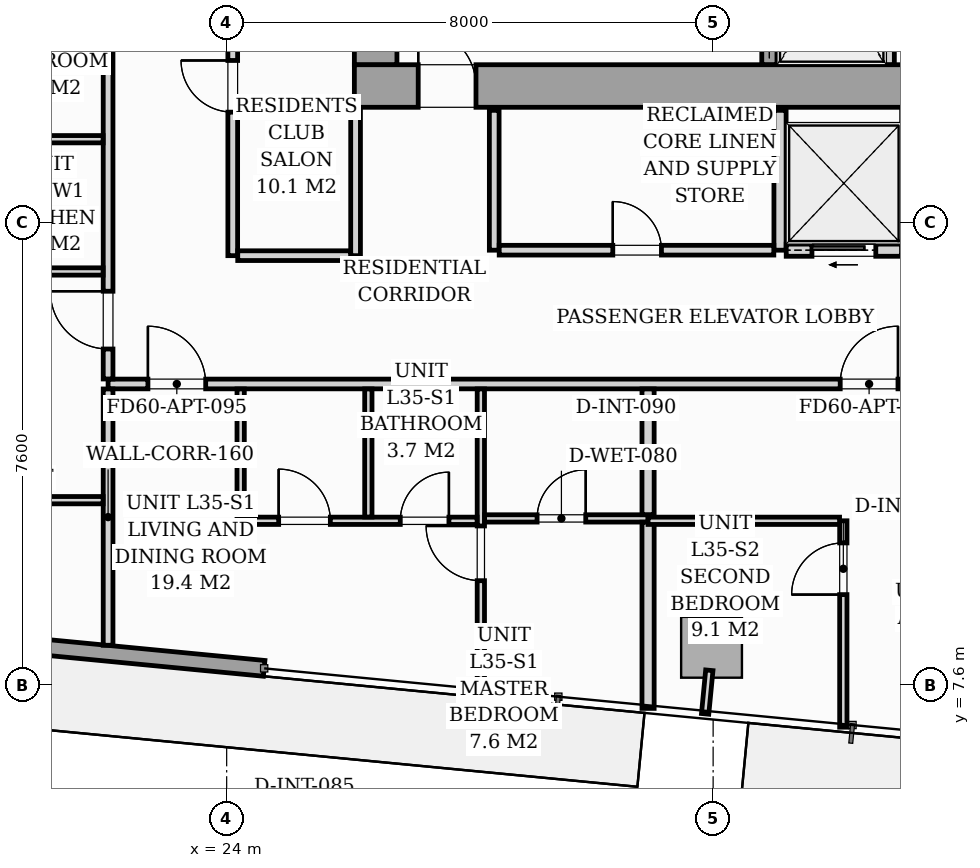
"""IFC4 building model, lengths in metres.
Left out: names, types, materials, properties, quantities, classifications, styles, units other than length and angle.
Written with IfcOpenShell. Run it as: python <this file> out.ifc"""

import sys

from ifc_helpers import new_model, si_unit, direction, frame, frame_2d, origin, origin_2d, place, context, subcontext, project, spatial, rectangle, i_section, extrude, source, transform, mapped, element, fill, save


model = new_model("IFC4")
c1 = context("Model", 3, precision=1e-05, world=origin(), true_north=direction((0.0, 1.0)))
c2 = subcontext(c1, "Body", "Model", "MODEL_VIEW")
j1 = project(units=[si_unit("LENGTHUNIT", "METRE"), si_unit("PLANEANGLEUNIT", "RADIAN")], contexts=[c1])
p1 = place(None, origin())
s1 = spatial("IfcSite", under=j1, at=p1, CompositionType="ELEMENT")
p2 = place(p1, origin())
s2 = spatial("IfcBuilding", under=s1, at=p2, CompositionType="ELEMENT")
p3 = place(p2, frame((0.0, 0.0, 124.6)))
s3 = spatial("IfcBuildingStorey", under=s2, at=p3, CompositionType="ELEMENT", Elevation=124.6)
m1 = source(origin(), c2, "Body", "SweptSolid", [
    extrude(i_section(OverallWidth=0.421, OverallDepth=0.465, WebThickness=0.045, FlangeThickness=0.073, FilletRadius=0.018, at=origin_2d()), origin(), (0.0, 0.0, 1.0), 3.196),
])
for number, where, z_axis, x_axis in (
    (1, (26.4, 17.4, 0.002), (0.0, 0.0, 1.0), (1.0, 0.0, 0.0)),
    (2, (33.12, 17.4, 0.002), (0.0, 0.0, 1.0), (1.0, 0.0, 0.0)),
):
    element("IfcColumn", number, at=place(p3, frame(where, z_axis=z_axis, x_axis=x_axis)), inside=s3, PredefinedType="PILASTER", context=c2, shape_type="MappedRepresentation", body=[
        mapped(m1, transform((0.0, 0.0, 0.0), scale=1.0)),
    ])
m2 = source(origin(), c2, "Body", "SweptSolid", [
    extrude(rectangle(XDim=1.0, YDim=1.0, at=origin_2d()), origin(), (0.0, 0.0, 1.0), 3.194),
])
p4 = place(p3, frame((31.974, 8.22, 0.004), z_axis=(0.0, 0.0, 1.0), x_axis=(0.995396198367, -0.09584575252, 0.0)))
e3 = element("IfcColumn", 3, at=p4, inside=s3, PredefinedType="COLUMN", context=c2, shape_type="MappedRepresentation", body=[
    mapped(m2, transform((0.0, 0.0, 0.0), scale=1.0)),
])
p5 = place(p3, frame((24.617, 7.873, 0.0), z_axis=(0.0, 0.0, 1.0), x_axis=(-0.995395976631, 0.095848055311, 0.0)))
e4 = element("IfcWall", 4, at=p5, inside=s3, PredefinedType="STANDARD", context=c2, shape_type="SweptSolid", body=[
    extrude(rectangle(XDim=17.01, YDim=0.26, at=frame_2d((8.505, 0.0))), origin(), (0.0, 0.0, 1.0), 2.94),
])
p6 = place(p5, frame((6.65, 0.0, 0.0)))
e5 = element("IfcOpeningElement", 5, at=p6, cuts=e4, PredefinedType="OPENING", context=c2, shape_type="SweptSolid", body=[
    extrude(rectangle(XDim=1.8, YDim=2.06, at=frame_2d((0.9, 1.03))), frame((0.0, 0.14, 0.0), z_axis=(0.0, -1.0, 0.0), x_axis=(1.0, 0.0, 0.0)), (0.0, 0.0, 1.0), 0.28),
])
p7 = place(p5, frame((9.25, 0.0, 0.65)))
e6 = element("IfcOpeningElement", 6, at=p7, cuts=e4, PredefinedType="OPENING", context=c2, shape_type="SweptSolid", body=[
    extrude(rectangle(XDim=1.6, YDim=1.5, at=frame_2d((0.8, 0.75))), frame((0.0, 0.14, 0.0), z_axis=(0.0, -1.0, 0.0), x_axis=(1.0, 0.0, 0.0)), (0.0, 0.0, 1.0), 0.28),
])
p8 = place(p3, frame((26.1, 17.45, 0.0), z_axis=(0.0, 0.0, 1.0), x_axis=(1.0, 0.0, 0.0)))
e7 = element("IfcWall", 7, at=p8, inside=s3, PredefinedType="SHEAR", context=c2, shape_type="SweptSolid", body=[
    extrude(rectangle(XDim=19.8, YDim=0.7, at=frame_2d((9.9, 0.0))), origin(), (0.0, 0.0, 1.0), 3.2),
])
p9 = place(p8, frame((1.05, 0.0, 0.0)))
e8 = element("IfcOpeningElement", 8, at=p9, cuts=e7, PredefinedType="OPENING", context=c2, shape_type="SweptSolid", body=[
    extrude(rectangle(XDim=0.95, YDim=2.06, at=frame_2d((0.475, 1.03))), frame((0.0, 0.36, 0.0), z_axis=(0.0, -1.0, 0.0), x_axis=(1.0, 0.0, 0.0)), (0.0, 0.0, 1.0), 0.72),
])
p10 = place(p8, frame((9.48, 0.0, 0.0)))
e9 = element("IfcOpeningElement", 9, at=p10, cuts=e7, PredefinedType="OPENING", context=c2, shape_type="SweptSolid", body=[
    extrude(rectangle(XDim=0.85, YDim=2.0, at=frame_2d((0.425, 1.0))), frame((0.0, 0.36, 0.0), z_axis=(0.0, -1.0, 0.0), x_axis=(1.0, 0.0, 0.0)), (0.0, 0.0, 1.0), 0.72),
])
p11 = place(p8, frame((17.65, 0.0, 0.0)))
e10 = element("IfcOpeningElement", 10, at=p11, cuts=e7, PredefinedType="OPENING", context=c2, shape_type="SweptSolid", body=[
    extrude(rectangle(XDim=0.95, YDim=2.06, at=frame_2d((0.475, 1.03))), frame((0.0, 0.36, 0.0), z_axis=(0.0, -1.0, 0.0), x_axis=(1.0, 0.0, 0.0)), (0.0, 0.0, 1.0), 0.72),
])
p12 = place(p3, frame((26.45, 17.802, 0.0), z_axis=(0.0, 0.0, 1.0), x_axis=(0.0, 1.0, 0.0)))
e11 = element("IfcWall", 11, at=p12, inside=s3, PredefinedType="SHEAR", context=c2, shape_type="SweptSolid", body=[
    extrude(rectangle(XDim=5.796, YDim=0.7, at=frame_2d((2.898, 0.0))), origin(), (0.0, 0.0, 1.0), 3.2),
])
p13 = place(p3, frame((32.925, 17.802, 0.0), z_axis=(0.0, 0.0, 1.0), x_axis=(0.0, 1.0, 0.0)))
e12 = element("IfcWall", 12, at=p13, inside=s3, PredefinedType="SOLIDWALL", context=c2, shape_type="SweptSolid", body=[
    extrude(rectangle(XDim=2.646, YDim=0.25, at=frame_2d((1.323, 0.0))), origin(), (0.0, 0.0, 1.0), 3.2),
])
p14 = place(p13, frame((0.598, 0.0, 0.0)))
e13 = element("IfcOpeningElement", 13, at=p14, cuts=e12, PredefinedType="OPENING", context=c2, shape_type="SweptSolid", body=[
    extrude(rectangle(XDim=1.1, YDim=2.08, at=frame_2d((0.55, 1.04))), frame((0.0, 0.135, 0.0), z_axis=(0.0, -1.0, 0.0), x_axis=(1.0, 0.0, 0.0)), (0.0, 0.0, 1.0), 0.27),
])
p15 = place(p3, frame((34.9, 17.802, 0.0), z_axis=(0.0, 0.0, 1.0), x_axis=(0.0, 1.0, 0.0)))
e14 = element("IfcWall", 14, at=p15, inside=s3, PredefinedType="PARTITIONING", context=c2, shape_type="SweptSolid", body=[
    extrude(rectangle(XDim=2.646, YDim=0.16, at=frame_2d((1.323, 0.0))), origin(), (0.0, 0.0, 1.0), 2.94),
])
p16 = place(p3, frame((28.4, 14.75, 0.0), z_axis=(0.0, 0.0, 1.0), x_axis=(0.0, 1.0, 0.0)))
e15 = element("IfcWall", 15, at=p16, inside=s3, PredefinedType="PARTITIONING", context=c2, shape_type="SweptSolid", body=[
    extrude(rectangle(XDim=2.3, YDim=0.16, at=frame_2d((1.15, 0.0))), origin(), (0.0, 0.0, 1.0), 2.94),
])
p17 = place(p3, frame((33.1, 14.75, 0.0), z_axis=(0.0, 0.0, 1.0), x_axis=(0.0, 1.0, 0.0)))
e16 = element("IfcWall", 16, at=p17, inside=s3, PredefinedType="PARTITIONING", context=c2, shape_type="SweptSolid", body=[
    extrude(rectangle(XDim=2.3, YDim=0.2, at=frame_2d((1.15, 0.0))), origin(), (0.0, 0.0, 1.0), 2.94),
])
p18 = place(p3, frame((28.482, 14.75, 0.0), z_axis=(0.0, 0.0, 1.0), x_axis=(1.0, 0.0, 0.0)))
e17 = element("IfcWall", 17, at=p18, inside=s3, PredefinedType="PARTITIONING", context=c2, shape_type="SweptSolid", body=[
    extrude(rectangle(XDim=4.516, YDim=0.16, at=frame_2d((2.258, 0.0))), origin(), (0.0, 0.0, 1.0), 2.94),
])
p19 = place(p18, frame((1.868, 0.0, 0.0)))
e18 = element("IfcOpeningElement", 18, at=p19, cuts=e17, PredefinedType="OPENING", context=c2, shape_type="SweptSolid", body=[
    extrude(rectangle(XDim=0.8, YDim=2.05, at=frame_2d((0.4, 1.025))), frame((0.0, 0.09, 0.0), z_axis=(0.0, -1.0, 0.0), x_axis=(1.0, 0.0, 0.0)), (0.0, 0.0, 1.0), 0.18),
])
p20 = place(p3, frame((33.202, 14.75, 0.0), z_axis=(0.0, 0.0, 1.0), x_axis=(1.0, 0.0, 0.0)))
e19 = element("IfcWall", 19, at=p20, inside=s3, PredefinedType="PARTITIONING", context=c2, shape_type="SweptSolid", body=[
    extrude(rectangle(XDim=1.896, YDim=0.2, at=frame_2d((0.948, 0.0))), origin(), (0.0, 0.0, 1.0), 2.94),
])
p21 = place(p20, frame((0.423, 0.0, 0.0)))
e20 = element("IfcOpeningElement", 20, at=p21, cuts=e19, PredefinedType="OPENING", context=c2, shape_type="SweptSolid", body=[
    extrude(rectangle(XDim=1.05, YDim=2.08, at=frame_2d((0.525, 1.04))), frame((0.0, 0.11, 0.0), z_axis=(0.0, -1.0, 0.0), x_axis=(1.0, 0.0, 0.0)), (0.0, 0.0, 1.0), 0.22),
])
p22 = place(p3, frame((22.05, 12.55, 0.0), z_axis=(0.0, 0.0, 1.0), x_axis=(1.0, 0.0, 0.0)))
e21 = element("IfcWall", 21, at=p22, inside=s3, PredefinedType="PARTITIONING", context=c2, shape_type="SweptSolid", body=[
    extrude(rectangle(XDim=23.83, YDim=0.16, at=frame_2d((11.915, 0.0))), origin(), (0.0, 0.0, 1.0), 2.94),
])
p23 = place(p22, frame((0.655, 0.0, 0.0)))
e22 = element("IfcOpeningElement", 22, at=p23, cuts=e21, PredefinedType="OPENING", context=c2, shape_type="SweptSolid", body=[
    extrude(rectangle(XDim=0.95, YDim=2.06, at=frame_2d((0.475, 1.03))), frame((0.0, 0.09, 0.0), z_axis=(0.0, -1.0, 0.0), x_axis=(1.0, 0.0, 0.0)), (0.0, 0.0, 1.0), 0.18),
])
p24 = place(p22, frame((12.04, 0.0, 0.0)))
e23 = element("IfcOpeningElement", 23, at=p24, cuts=e21, PredefinedType="OPENING", context=c2, shape_type="SweptSolid", body=[
    extrude(rectangle(XDim=0.95, YDim=2.06, at=frame_2d((0.475, 1.03))), frame((0.0, 0.09, 0.0), z_axis=(0.0, -1.0, 0.0), x_axis=(1.0, 0.0, 0.0)), (0.0, 0.0, 1.0), 0.18),
])
p25 = place(p3, frame((22.05, 8.253, 0.0), z_axis=(0.0, 0.0, 1.0), x_axis=(0.0, 1.0, 0.0)))
e24 = element("IfcWall", 24, at=p25, inside=s3, PredefinedType="PARTITIONING", context=c2, shape_type="SweptSolid", body=[
    extrude(rectangle(XDim=4.215, YDim=0.16, at=frame_2d((2.107, 0.0))), origin(), (0.0, 0.0, 1.0), 2.94),
])
p26 = place(p3, frame((22.05, 12.632, 0.0), z_axis=(0.0, 0.0, 1.0), x_axis=(0.0, 1.0, 0.0)))
e25 = element("IfcWall", 25, at=p26, inside=s3, PredefinedType="PARTITIONING", context=c2, shape_type="SweptSolid", body=[
    extrude(rectangle(XDim=14.785, YDim=0.16, at=frame_2d((7.393, 0.0))), origin(), (0.0, 0.0, 1.0), 2.94),
])
p27 = place(p26, frame((0.493, 0.0, 0.0)))
e26 = element("IfcOpeningElement", 26, at=p27, cuts=e25, PredefinedType="OPENING", context=c2, shape_type="SweptSolid", body=[
    extrude(rectangle(XDim=0.95, YDim=2.06, at=frame_2d((0.475, 1.03))), frame((0.0, 0.09, 0.0), z_axis=(0.0, -1.0, 0.0), x_axis=(1.0, 0.0, 0.0)), (0.0, 0.0, 1.0), 0.18),
])
p28 = place(p3, frame((28.18, 7.48, 0.0), z_axis=(0.0, 0.0, 1.0), x_axis=(0.0, 1.0, 0.0)))
e27 = element("IfcWall", 27, at=p28, inside=s3, PredefinedType="PARTITIONING", context=c2, shape_type="SweptSolid", body=[
    extrude(rectangle(XDim=4.988, YDim=0.12, at=frame_2d((2.494, 0.0))), origin(), (0.0, 0.0, 1.0), 2.94),
])
p29 = place(p28, frame((1.835, 0.0, 0.0)))
e28 = element("IfcOpeningElement", 28, at=p29, cuts=e27, PredefinedType="OPENING", context=c2, shape_type="SweptSolid", body=[
    extrude(rectangle(XDim=0.9, YDim=2.05, at=frame_2d((0.45, 1.025))), frame((0.0, 0.07, 0.0), z_axis=(0.0, -1.0, 0.0), x_axis=(1.0, 0.0, 0.0)), (0.0, 0.0, 1.0), 0.14),
])
p30 = place(p3, frame((24.23, 10.3, 0.0), z_axis=(0.0, 0.0, 1.0), x_axis=(1.0, 0.0, 0.0)))
e29 = element("IfcWall", 29, at=p30, inside=s3, PredefinedType="PARTITIONING", context=c2, shape_type="SweptSolid", body=[
    extrude(rectangle(XDim=3.888, YDim=0.12, at=frame_2d((1.944, 0.0))), origin(), (0.0, 0.0, 1.0), 2.94),
])
p31 = place(p30, frame((0.625, 0.0, 0.0)))
e30 = element("IfcOpeningElement", 30, at=p31, cuts=e29, PredefinedType="OPENING", context=c2, shape_type="SweptSolid", body=[
    extrude(rectangle(XDim=0.85, YDim=2.05, at=frame_2d((0.425, 1.025))), frame((0.0, 0.07, 0.0), z_axis=(0.0, -1.0, 0.0), x_axis=(1.0, 0.0, 0.0)), (0.0, 0.0, 1.0), 0.14),
])
p32 = place(p30, frame((2.625, 0.0, 0.0)))
e31 = element("IfcOpeningElement", 31, at=p32, cuts=e29, PredefinedType="OPENING", context=c2, shape_type="SweptSolid", body=[
    extrude(rectangle(XDim=0.8, YDim=2.02, at=frame_2d((0.4, 1.01))), frame((0.0, 0.07, 0.0), z_axis=(0.0, -1.0, 0.0), x_axis=(1.0, 0.0, 0.0)), (0.0, 0.0, 1.0), 0.14),
])
for number, where, z_axis, x_axis in (
    (32, (26.33, 10.362, 0.0), (0.0, 0.0, 1.0), (0.0, 1.0, 0.0)),
    (33, (24.23, 10.362, 0.0), (0.0, 0.0, 1.0), (0.0, 1.0, 0.0)),
):
    element("IfcWall", number, at=place(p3, frame(where, z_axis=z_axis, x_axis=x_axis)), inside=s3, PredefinedType="PARTITIONING", context=c2, shape_type="SweptSolid", body=[
        extrude(rectangle(XDim=2.106, YDim=0.12, at=frame_2d((1.053, 0.0))), origin(), (0.0, 0.0, 1.0), 2.94),
    ])
p33 = place(p3, frame((28.242, 10.339, 0.0), z_axis=(0.0, 0.0, 1.0), x_axis=(1.0, 0.0, 0.0)))
e34 = element("IfcWall", 34, at=p33, inside=s3, PredefinedType="PARTITIONING", context=c2, shape_type="SweptSolid", body=[
    extrude(rectangle(XDim=2.688, YDim=0.12, at=frame_2d((1.344, 0.0))), origin(), (0.0, 0.0, 1.0), 2.94),
])
p34 = place(p33, frame((0.863, 0.0, 0.0)))
e35 = element("IfcOpeningElement", 35, at=p34, cuts=e34, PredefinedType="OPENING", context=c2, shape_type="SweptSolid", body=[
    extrude(rectangle(XDim=0.8, YDim=2.02, at=frame_2d((0.4, 1.01))), frame((0.0, 0.07, 0.0), z_axis=(0.0, -1.0, 0.0), x_axis=(1.0, 0.0, 0.0)), (0.0, 0.0, 1.0), 0.14),
])
p35 = place(p3, frame((30.93, 7.215, 0.0), z_axis=(0.0, 0.0, 1.0), x_axis=(0.0, 1.0, 0.0)))
e36 = element("IfcWall", 36, at=p35, inside=s3, PredefinedType="PARTITIONING", context=c2, shape_type="SweptSolid", body=[
    extrude(rectangle(XDim=3.062, YDim=0.2, at=frame_2d((1.531, 0.0))), origin(), (0.0, 0.0, 1.0), 2.94),
])
p36 = place(p3, frame((30.93, 10.401, 0.0), z_axis=(0.0, 0.0, 1.0), x_axis=(0.0, 1.0, 0.0)))
e37 = element("IfcWall", 37, at=p36, inside=s3, PredefinedType="PARTITIONING", context=c2, shape_type="SweptSolid", body=[
    extrude(rectangle(XDim=2.067, YDim=0.2, at=frame_2d((1.034, 0.0))), origin(), (0.0, 0.0, 1.0), 2.94),
])
p37 = place(p3, frame((34.141, 6.906, 0.0), z_axis=(0.0, 0.0, 1.0), x_axis=(0.0, 1.0, 0.0)))
e38 = element("IfcWall", 38, at=p37, inside=s3, PredefinedType="PARTITIONING", context=c2, shape_type="SweptSolid", body=[
    extrude(rectangle(XDim=3.394, YDim=0.12, at=frame_2d((1.697, 0.0))), origin(), (0.0, 0.0, 1.0), 2.94),
])
p38 = place(p37, frame((2.18, 0.0, 0.0)))
e39 = element("IfcOpeningElement", 39, at=p38, cuts=e38, PredefinedType="OPENING", context=c2, shape_type="SweptSolid", body=[
    extrude(rectangle(XDim=0.85, YDim=2.05, at=frame_2d((0.425, 1.025))), frame((0.0, 0.07, 0.0), z_axis=(0.0, -1.0, 0.0), x_axis=(1.0, 0.0, 0.0)), (0.0, 0.0, 1.0), 0.14),
])
p39 = place(p3, frame((30.93, 10.3, 0.0), z_axis=(0.0, 0.0, 1.0), x_axis=(1.0, 0.0, 0.0)))
e40 = element("IfcWall", 40, at=p39, inside=s3, PredefinedType="PARTITIONING", context=c2, shape_type="SweptSolid", body=[
    extrude(rectangle(XDim=3.149, YDim=0.12, at=frame_2d((1.575, 0.0))), origin(), (0.0, 0.0, 1.0), 2.94),
])
for number, where, z_axis, x_axis in (
    (41, (19.712, 16.575, 0.0), (0.0, 0.0, 1.0), (1.0, 0.0, 0.0)),
    (42, (19.712, 14.4, 0.0), (0.0, 0.0, 1.0), (1.0, 0.0, 0.0)),
):
    element("IfcWall", number, at=place(p3, frame(where, z_axis=z_axis, x_axis=x_axis)), inside=s3, PredefinedType="PARTITIONING", context=c2, shape_type="SweptSolid", body=[
        extrude(rectangle(XDim=2.256, YDim=0.12, at=frame_2d((1.128, 0.0))), origin(), (0.0, 0.0, 1.0), 2.94),
    ])
p40 = place(p3, frame((8.395, 10.639, 0.0), z_axis=(0.0, 0.0, 1.0), x_axis=(1.0, 0.0, 0.0)))
e43 = element("IfcWall", 43, at=p40, inside=s3, PredefinedType="PARTITIONING", context=c2, shape_type="SweptSolid", body=[
    extrude(rectangle(XDim=13.573, YDim=0.12, at=frame_2d((6.787, 0.0))), origin(), (0.0, 0.0, 1.0), 2.94),
])
p41 = place(p40, frame((7.451, 0.0, 0.0)))
e44 = element("IfcOpeningElement", 44, at=p41, cuts=e43, PredefinedType="OPENING", context=c2, shape_type="SweptSolid", body=[
    extrude(rectangle(XDim=0.85, YDim=2.05, at=frame_2d((0.425, 1.025))), frame((0.0, 0.07, 0.0), z_axis=(0.0, -1.0, 0.0), x_axis=(1.0, 0.0, 0.0)), (0.0, 0.0, 1.0), 0.14),
])
p42 = place(p3, frame((24.1, 14.66, 0.0), z_axis=(0.0, 0.0, 1.0), x_axis=(0.0, 1.0, 0.0)))
e45 = element("IfcWall", 45, at=p42, inside=s3, PredefinedType="PARTITIONING", context=c2, shape_type="SweptSolid", body=[
    extrude(rectangle(XDim=5.59, YDim=0.16, at=frame_2d((2.795, 0.0))), origin(), (0.0, 0.0, 1.0), 2.94),
])
p43 = place(p42, frame((2.36, 0.0, 0.0)))
e46 = element("IfcOpeningElement", 46, at=p43, cuts=e45, PredefinedType="OPENING", context=c2, shape_type="SweptSolid", body=[
    extrude(rectangle(XDim=0.85, YDim=2.0, at=frame_2d((0.425, 1.0))), frame((0.0, 0.09, 0.0), z_axis=(0.0, -1.0, 0.0), x_axis=(1.0, 0.0, 0.0)), (0.0, 0.0, 1.0), 0.18),
])
p44 = place(p3, frame((26.12, 14.66, 0.0), z_axis=(0.0, 0.0, 1.0), x_axis=(0.0, 1.0, 0.0)))
e47 = element("IfcWall", 47, at=p44, inside=s3, PredefinedType="PARTITIONING", context=c2, shape_type="SweptSolid", body=[
    extrude(rectangle(XDim=2.438, YDim=0.16, at=frame_2d((1.219, 0.0))), origin(), (0.0, 0.0, 1.0), 2.94),
])
p45 = place(p3, frame((24.182, 14.66, 0.0), z_axis=(0.0, 0.0, 1.0), x_axis=(1.0, 0.0, 0.0)))
e48 = element("IfcWall", 48, at=p45, inside=s3, PredefinedType="PARTITIONING", context=c2, shape_type="SweptSolid", body=[
    extrude(rectangle(XDim=1.856, YDim=0.16, at=frame_2d((0.928, 0.0))), origin(), (0.0, 0.0, 1.0), 2.94),
])
p46 = place(p3, frame((31.938, 7.841, 0.0), z_axis=(0.0, 0.0, 1.0), x_axis=(-0.095977354523, -0.995383517755, 0.0)))
e49 = element("IfcWall", 49, at=p46, inside=s3, PredefinedType="PARTITIONING", context=c2, shape_type="SweptSolid", body=[
    extrude(rectangle(XDim=0.72, YDim=0.12, at=frame_2d((0.36, 0.0))), origin(), (0.0, 0.0, 1.0), 2.94),
])
m3 = source(origin(), c2, "Body", "SweptSolid", [
    extrude(rectangle(XDim=0.95, YDim=2.06, at=frame_2d((0.475, 1.03))), frame((0.0, 0.025, 0.0), z_axis=(0.0, -1.0, 0.0), x_axis=(1.0, 0.0, 0.0)), (0.0, 0.0, 1.0), 0.05),
])
p47 = place(p9, origin())
e50 = element("IfcDoor", 50, at=p47, inside=s3, OperationType="SINGLE_SWING_LEFT", PredefinedType="DOOR", context=c2, shape_type="MappedRepresentation", body=[
    mapped(m3, transform((0.0, 0.0, 0.0), scale=1.0)),
])
fill(e8, e50)
m4 = source(origin(), c2, "Body", "SweptSolid", [
    extrude(rectangle(XDim=0.8, YDim=2.05, at=frame_2d((0.4, 1.025))), frame((0.0, 0.025, 0.0), z_axis=(0.0, -1.0, 0.0), x_axis=(1.0, 0.0, 0.0)), (0.0, 0.0, 1.0), 0.05),
])
p48 = place(p19, origin())
e51 = element("IfcDoor", 51, at=p48, inside=s3, OperationType="SINGLE_SWING_LEFT", PredefinedType="DOOR", context=c2, shape_type="MappedRepresentation", body=[
    mapped(m4, transform((0.0, 0.0, 0.0), scale=1.0)),
])
fill(e18, e51)
m5 = source(origin(), c2, "Body", "SweptSolid", [
    extrude(rectangle(XDim=1.05, YDim=2.08, at=frame_2d((0.525, 1.04))), frame((0.0, 0.025, 0.0), z_axis=(0.0, -1.0, 0.0), x_axis=(1.0, 0.0, 0.0)), (0.0, 0.0, 1.0), 0.05),
])
p49 = place(p21, origin())
e52 = element("IfcDoor", 52, at=p49, inside=s3, OperationType="SLIDING_TO_LEFT", PredefinedType="DOOR", context=c2, shape_type="MappedRepresentation", body=[
    mapped(m5, transform((0.0, 0.0, 0.0), scale=1.0)),
])
fill(e20, e52)
m6 = source(origin(), c2, "Body", "SweptSolid", [
    extrude(rectangle(XDim=0.8, YDim=2.02, at=frame_2d((0.4, 1.01))), frame((0.0, 0.025, 0.0), z_axis=(0.0, -1.0, 0.0), x_axis=(1.0, 0.0, 0.0)), (0.0, 0.0, 1.0), 0.05),
])
p50 = place(p34, origin())
e53 = element("IfcDoor", 53, at=p50, inside=s3, OperationType="SINGLE_SWING_RIGHT", PredefinedType="DOOR", context=c2, shape_type="MappedRepresentation", body=[
    mapped(m6, transform((0.0, 0.0, 0.0), scale=1.0)),
])
fill(e35, e53)
m7 = source(origin(), c2, "Body", "SweptSolid", [
    extrude(rectangle(XDim=0.95, YDim=2.06, at=frame_2d((0.475, 1.03))), frame((0.0, 0.025, 0.0), z_axis=(0.0, -1.0, 0.0), x_axis=(1.0, 0.0, 0.0)), (0.0, 0.0, 1.0), 0.05),
])
p51 = place(p23, origin())
e54 = element("IfcDoor", 54, at=p51, inside=s3, OperationType="SINGLE_SWING_LEFT", PredefinedType="DOOR", context=c2, shape_type="MappedRepresentation", body=[
    mapped(m7, transform((0.0, 0.0, 0.0), scale=1.0)),
])
fill(e22, e54)
m8 = source(origin(), c2, "Body", "SweptSolid", [
    extrude(rectangle(XDim=0.9, YDim=2.05, at=frame_2d((0.45, 1.025))), frame((0.0, 0.025, 0.0), z_axis=(0.0, -1.0, 0.0), x_axis=(1.0, 0.0, 0.0)), (0.0, 0.0, 1.0), 0.05),
])
p52 = place(p29, origin())
e55 = element("IfcDoor", 55, at=p52, inside=s3, OperationType="SINGLE_SWING_RIGHT", PredefinedType="DOOR", context=c2, shape_type="MappedRepresentation", body=[
    mapped(m8, transform((0.0, 0.0, 0.0), scale=1.0)),
])
fill(e28, e55)
m9 = source(origin(), c2, "Body", "SweptSolid", [
    extrude(rectangle(XDim=0.85, YDim=2.05, at=frame_2d((0.425, 1.025))), frame((0.0, 0.025, 0.0), z_axis=(0.0, -1.0, 0.0), x_axis=(1.0, 0.0, 0.0)), (0.0, 0.0, 1.0), 0.05),
])
p53 = place(p31, origin())
e56 = element("IfcDoor", 56, at=p53, inside=s3, OperationType="SINGLE_SWING_LEFT", PredefinedType="DOOR", context=c2, shape_type="MappedRepresentation", body=[
    mapped(m9, transform((0.0, 0.0, 0.0), scale=1.0)),
])
fill(e30, e56)
p54 = place(p32, origin())
e57 = element("IfcDoor", 57, at=p54, inside=s3, OperationType="SINGLE_SWING_RIGHT", PredefinedType="DOOR", context=c2, shape_type="MappedRepresentation", body=[
    mapped(m6, transform((0.0, 0.0, 0.0), scale=1.0)),
])
fill(e31, e57)
p55 = place(p38, origin())
e58 = element("IfcDoor", 58, at=p55, inside=s3, OperationType="SINGLE_SWING_LEFT", PredefinedType="DOOR", context=c2, shape_type="MappedRepresentation", body=[
    mapped(m9, transform((0.0, 0.0, 0.0), scale=1.0)),
])
fill(e39, e58)
p56 = place(p24, origin())
e59 = element("IfcDoor", 59, at=p56, inside=s3, OperationType="SINGLE_SWING_RIGHT", PredefinedType="DOOR", context=c2, shape_type="MappedRepresentation", body=[
    mapped(m7, transform((0.0, 0.0, 0.0), scale=1.0)),
])
fill(e23, e59)
p57 = place(p27, origin())
e60 = element("IfcDoor", 60, at=p57, inside=s3, OperationType="SINGLE_SWING_RIGHT", PredefinedType="DOOR", context=c2, shape_type="MappedRepresentation", body=[
    mapped(m7, transform((0.0, 0.0, 0.0), scale=1.0)),
])
fill(e26, e60)
m10 = source(origin(), c2, "Body", "SweptSolid", [
    extrude(rectangle(XDim=0.85, YDim=2.0, at=frame_2d((0.425, 1.0))), frame((0.0, 0.025, 0.0), z_axis=(0.0, -1.0, 0.0), x_axis=(1.0, 0.0, 0.0)), (0.0, 0.0, 1.0), 0.05),
])
p58 = place(p43, origin())
e61 = element("IfcDoor", 61, at=p58, inside=s3, OperationType="SINGLE_SWING_RIGHT", PredefinedType="DOOR", context=c2, shape_type="MappedRepresentation", body=[
    mapped(m10, transform((0.0, 0.0, 0.0), scale=1.0)),
])
fill(e46, e61)
save(model, sys.argv[1])
